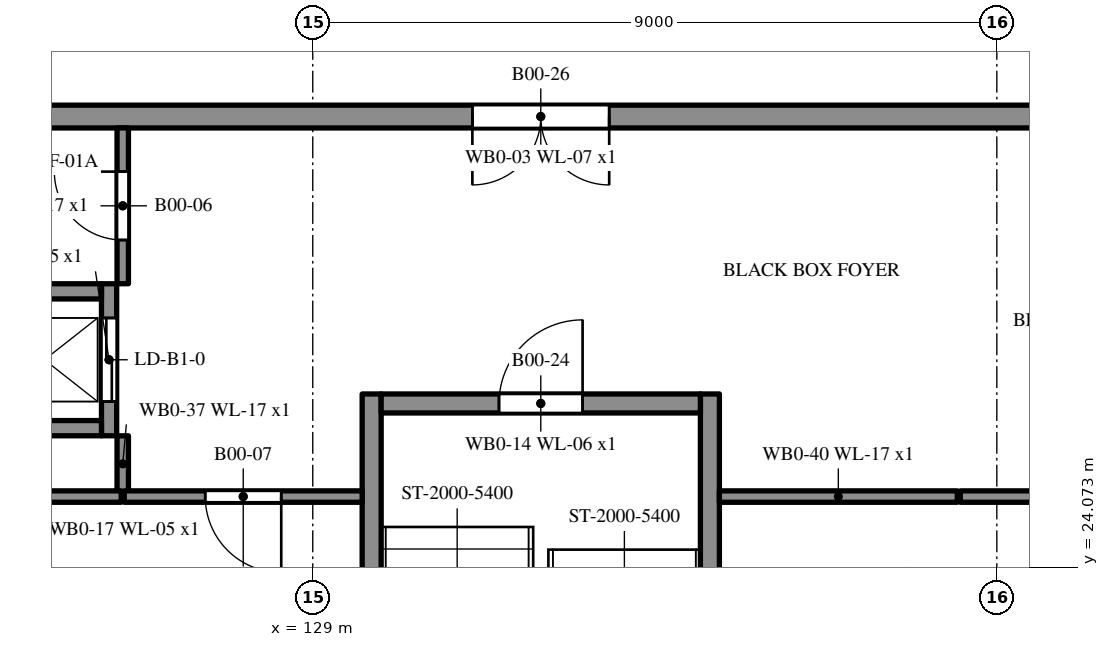
"""IFC4 building model, lengths in metres.
Left out: names, types, materials, properties, quantities, classifications, styles, units other than length and angle.
Written with IfcOpenShell. Run it as: python <this file> out.ifc"""

import sys

from ifc_helpers import new_model, si_unit, direction, frame, frame_2d, origin, place, context, subcontext, project, spatial, rectangle, extrude, element, fill, save


model = new_model("IFC4")
c1 = context("Model", 3, precision=1e-05, world=origin(), true_north=direction((0.0, 1.0)))
c2 = subcontext(c1, "Body", "Model", "MODEL_VIEW")
j1 = project(units=[si_unit("LENGTHUNIT", "METRE"), si_unit("PLANEANGLEUNIT", "RADIAN")], contexts=[c1])
p1 = place(None, origin())
s1 = spatial("IfcSite", under=j1, at=p1, CompositionType="ELEMENT")
p2 = place(p1, origin())
s2 = spatial("IfcBuilding", under=s1, at=p2, CompositionType="ELEMENT")
p3 = place(p2, origin())
s3 = spatial("IfcBuildingStorey", under=s2, at=p3, CompositionType="ELEMENT", Elevation=0.0)
p4 = place(p3, frame((139.85, 30.0, 0.0), z_axis=(0.0, 0.0, 1.0), x_axis=(-1.0, 0.0, 0.0)))
e1 = element("IfcWall", 1, at=p4, inside=s3, PredefinedType="SHEAR", context=c2, shape_type="SweptSolid", body=[
    extrude(rectangle(XDim=15.7, YDim=0.3, at=frame_2d((7.85, 0.0))), origin(), (0.0, 0.0, 1.0), 5.1),
])
p5 = place(p4, frame((6.95, 0.0, 0.0)))
e2 = element("IfcOpeningElement", 2, at=p5, cuts=e1, PredefinedType="OPENING", context=c2, shape_type="SweptSolid", body=[
    extrude(rectangle(XDim=1.8, YDim=2.1, at=frame_2d((0.9, 1.05))), frame((0.0, 0.16, 0.0), z_axis=(0.0, -1.0, 0.0), x_axis=(1.0, 0.0, 0.0)), (0.0, 0.0, 1.0), 0.32),
])
for number, where, z_axis, x_axis in (
    (3, (129.775, 26.35, 0.0), (0.0, 0.0, 1.0), (0.0, -1.0, 0.0)),
    (4, (134.225, 17.8, 0.0), (0.0, 0.0, 1.0), (0.0, 1.0, 0.0)),
):
    element("IfcWall", number, at=place(p3, frame(where, z_axis=z_axis, x_axis=x_axis)), inside=s3, PredefinedType="SHEAR", context=c2, shape_type="SweptSolid", body=[
        extrude(rectangle(XDim=8.55, YDim=0.25, at=frame_2d((4.275, 0.0))), origin(), (0.0, 0.0, 1.0), 5.4),
    ])
p6 = place(p3, frame((129.9, 26.225, 0.0), z_axis=(0.0, 0.0, 1.0), x_axis=(1.0, 0.0, 0.0)))
e5 = element("IfcWall", 5, at=p6, inside=s3, PredefinedType="SHEAR", context=c2, shape_type="SweptSolid", body=[
    extrude(rectangle(XDim=4.2, YDim=0.25, at=frame_2d((2.1, 0.0))), origin(), (0.0, 0.0, 1.0), 5.4),
])
p7 = place(p6, frame((1.55, 0.0, 0.0)))
e6 = element("IfcOpeningElement", 6, at=p7, cuts=e5, PredefinedType="OPENING", context=c2, shape_type="SweptSolid", body=[
    extrude(rectangle(XDim=1.1, YDim=2.1, at=frame_2d((0.55, 1.05))), frame((0.0, 0.135, 0.0), z_axis=(0.0, -1.0, 0.0), x_axis=(1.0, 0.0, 0.0)), (0.0, 0.0, 1.0), 0.27),
])
p8 = place(p3, frame((126.32, 25.8, -1.2), z_axis=(0.0, 0.0, 1.0), x_axis=(0.0, 1.0, 0.0)))
e7 = element("IfcWall", 7, at=p8, inside=s3, PredefinedType="SHEAR", context=c2, shape_type="SweptSolid", body=[
    extrude(rectangle(XDim=2.0, YDim=0.2, at=frame_2d((1.0, 0.0))), origin(), (0.0, 0.0, 1.0), 6.3),
])
p9 = place(p8, frame((0.45, 0.0, 1.2)))
e8 = element("IfcOpeningElement", 8, at=p9, cuts=e7, PredefinedType="OPENING", context=c2, shape_type="SweptSolid", body=[
    extrude(rectangle(XDim=1.1, YDim=2.2, at=frame_2d((0.55, 1.1))), frame((0.0, 0.11, 0.0), z_axis=(0.0, -1.0, 0.0), x_axis=(1.0, 0.0, 0.0)), (0.0, 0.0, 1.0), 0.22),
])
for number, where, z_axis, x_axis in (
    (9, (124.12, 25.9, -1.2), (0.0, 0.0, 1.0), (1.0, 0.0, 0.0)),
    (10, (126.22, 27.7, -1.2), (0.0, 0.0, 1.0), (-1.0, 0.0, 0.0)),
):
    element("IfcWall", number, at=place(p3, frame(where, z_axis=z_axis, x_axis=x_axis)), inside=s3, PredefinedType="SHEAR", context=c2, shape_type="SweptSolid", body=[
        extrude(rectangle(XDim=2.1, YDim=0.2, at=frame_2d((1.05, 0.0))), origin(), (0.0, 0.0, 1.0), 6.3),
    ])
p10 = place(p3, frame((126.5, 25.06, 0.0), z_axis=(0.0, 0.0, 1.0), x_axis=(0.0, 1.0, 0.0)))
e11 = element("IfcWall", 11, at=p10, inside=s3, PredefinedType="PARTITIONING", context=c2, shape_type="SweptSolid", body=[
    extrude(rectangle(XDim=0.74, YDim=0.15, at=frame_2d((0.37, 0.0))), origin(), (0.0, 0.0, 1.0), 5.1),
])
p11 = place(p3, frame((126.5, 27.801, 0.0), z_axis=(0.0, 0.0, 1.0), x_axis=(0.0, 1.0, 0.0)))
e12 = element("IfcWall", 12, at=p11, inside=s3, PredefinedType="PARTITIONING", context=c2, shape_type="SweptSolid", body=[
    extrude(rectangle(XDim=2.05, YDim=0.15, at=frame_2d((1.025, 0.0))), origin(), (0.0, 0.0, 1.0), 5.1),
])
p12 = place(p11, frame((0.575, 0.0, 0.0)))
e13 = element("IfcOpeningElement", 13, at=p12, cuts=e12, PredefinedType="OPENING", context=c2, shape_type="SweptSolid", body=[
    extrude(rectangle(XDim=0.9, YDim=2.1, at=frame_2d((0.45, 1.05))), frame((0.0, 0.085, 0.0), z_axis=(0.0, -1.0, 0.0), x_axis=(1.0, 0.0, 0.0)), (0.0, 0.0, 1.0), 0.17),
])
p13 = place(p3, frame((129.65, 25.0, 0.0), z_axis=(0.0, 0.0, 1.0), x_axis=(-1.0, 0.0, 0.0)))
e14 = element("IfcWall", 14, at=p13, inside=s3, PredefinedType="PARTITIONING", context=c2, shape_type="SweptSolid", body=[
    extrude(rectangle(XDim=3.13, YDim=0.15, at=frame_2d((1.565, 0.0))), origin(), (0.0, 0.0, 1.0), 5.1),
])
p14 = place(p13, frame((1.065, 0.0, 0.0)))
e15 = element("IfcOpeningElement", 15, at=p14, cuts=e14, PredefinedType="OPENING", context=c2, shape_type="SweptSolid", body=[
    extrude(rectangle(XDim=1.0, YDim=2.1, at=frame_2d((0.5, 1.05))), frame((0.0, 0.085, 0.0), z_axis=(0.0, -1.0, 0.0), x_axis=(1.0, 0.0, 0.0)), (0.0, 0.0, 1.0), 0.17),
])
p15 = place(p3, frame((137.48, 25.0, 0.0), z_axis=(0.0, 0.0, 1.0), x_axis=(-1.0, 0.0, 0.0)))
e16 = element("IfcWall", 16, at=p15, inside=s3, PredefinedType="PARTITIONING", context=c2, shape_type="SweptSolid", body=[
    extrude(rectangle(XDim=3.13, YDim=0.15, at=frame_2d((1.565, 0.0))), origin(), (0.0, 0.0, 1.0), 5.1),
])
p16 = place(p3, frame((141.816, 25.0, 0.0), z_axis=(0.0, 0.0, 1.0), x_axis=(-1.0, 0.0, 0.0)))
e17 = element("IfcWall", 17, at=p16, inside=s3, PredefinedType="PARTITIONING", context=c2, shape_type="SweptSolid", body=[
    extrude(rectangle(XDim=4.296, YDim=0.15, at=frame_2d((2.148, 0.0))), origin(), (0.0, 0.0, 1.0), 5.1),
])
p17 = place(p16, frame((1.698, 0.0, 0.0)))
e18 = element("IfcOpeningElement", 18, at=p17, cuts=e17, PredefinedType="OPENING", context=c2, shape_type="SweptSolid", body=[
    extrude(rectangle(XDim=0.9, YDim=2.1, at=frame_2d((0.45, 1.05))), frame((0.0, 0.085, 0.0), z_axis=(0.0, -1.0, 0.0), x_axis=(1.0, 0.0, 0.0)), (0.0, 0.0, 1.0), 0.17),
])
p18 = place(p3, frame((126.48, 25.0, 0.0), z_axis=(0.0, 0.0, 1.0), x_axis=(-1.0, 0.0, 0.0)))
e19 = element("IfcWall", 19, at=p18, inside=s3, PredefinedType="PARTITIONING", context=c2, shape_type="SweptSolid", body=[
    extrude(rectangle(XDim=4.276, YDim=0.15, at=frame_2d((2.138, 0.0))), origin(), (0.0, 0.0, 1.0), 5.1),
])
p19 = place(p9, origin())
e20 = element("IfcDoor", 20, at=p19, inside=s3, OperationType="SLIDING_TO_LEFT", PredefinedType="DOOR", context=c2, shape_type="SweptSolid", body=[
    extrude(rectangle(XDim=1.1, YDim=2.2, at=frame_2d((0.55, 1.1))), frame((0.0, 0.025, 0.0), z_axis=(0.0, -1.0, 0.0), x_axis=(1.0, 0.0, 0.0)), (0.0, 0.0, 1.0), 0.05),
])
fill(e8, e20)
p20 = place(p12, origin())
e21 = element("IfcDoor", 21, at=p20, inside=s3, OperationType="SINGLE_SWING_RIGHT", PredefinedType="DOOR", context=c2, shape_type="SweptSolid", body=[
    extrude(rectangle(XDim=0.9, YDim=2.1, at=frame_2d((0.45, 1.05))), frame((0.0, 0.025, 0.0), z_axis=(0.0, -1.0, 0.0), x_axis=(1.0, 0.0, 0.0)), (0.0, 0.0, 1.0), 0.05),
])
fill(e13, e21)
p21 = place(p14, origin())
e22 = element("IfcDoor", 22, at=p21, inside=s3, OperationType="SINGLE_SWING_LEFT", PredefinedType="DOOR", context=c2, shape_type="SweptSolid", body=[
    extrude(rectangle(XDim=1.0, YDim=2.1, at=frame_2d((0.5, 1.05))), frame((0.0, 0.025, 0.0), z_axis=(0.0, -1.0, 0.0), x_axis=(1.0, 0.0, 0.0)), (0.0, 0.0, 1.0), 0.05),
])
fill(e15, e22)
p22 = place(p7, origin())
e23 = element("IfcDoor", 23, at=p22, inside=s3, OperationType="SINGLE_SWING_RIGHT", PredefinedType="DOOR", context=c2, shape_type="SweptSolid", body=[
    extrude(rectangle(XDim=1.1, YDim=2.1, at=frame_2d((0.55, 1.05))), frame((0.0, 0.025, 0.0), z_axis=(0.0, -1.0, 0.0), x_axis=(1.0, 0.0, 0.0)), (0.0, 0.0, 1.0), 0.05),
])
fill(e6, e23)
p23 = place(p5, origin())
e24 = element("IfcDoor", 24, at=p23, inside=s3, OperationType="DOUBLE_DOOR_SINGLE_SWING", PredefinedType="DOOR", context=c2, shape_type="SweptSolid", body=[
    extrude(rectangle(XDim=1.8, YDim=2.1, at=frame_2d((0.9, 1.05))), frame((0.0, 0.025, 0.0), z_axis=(0.0, -1.0, 0.0), x_axis=(1.0, 0.0, 0.0)), (0.0, 0.0, 1.0), 0.05),
])
fill(e2, e24)
save(model, sys.argv[1])
